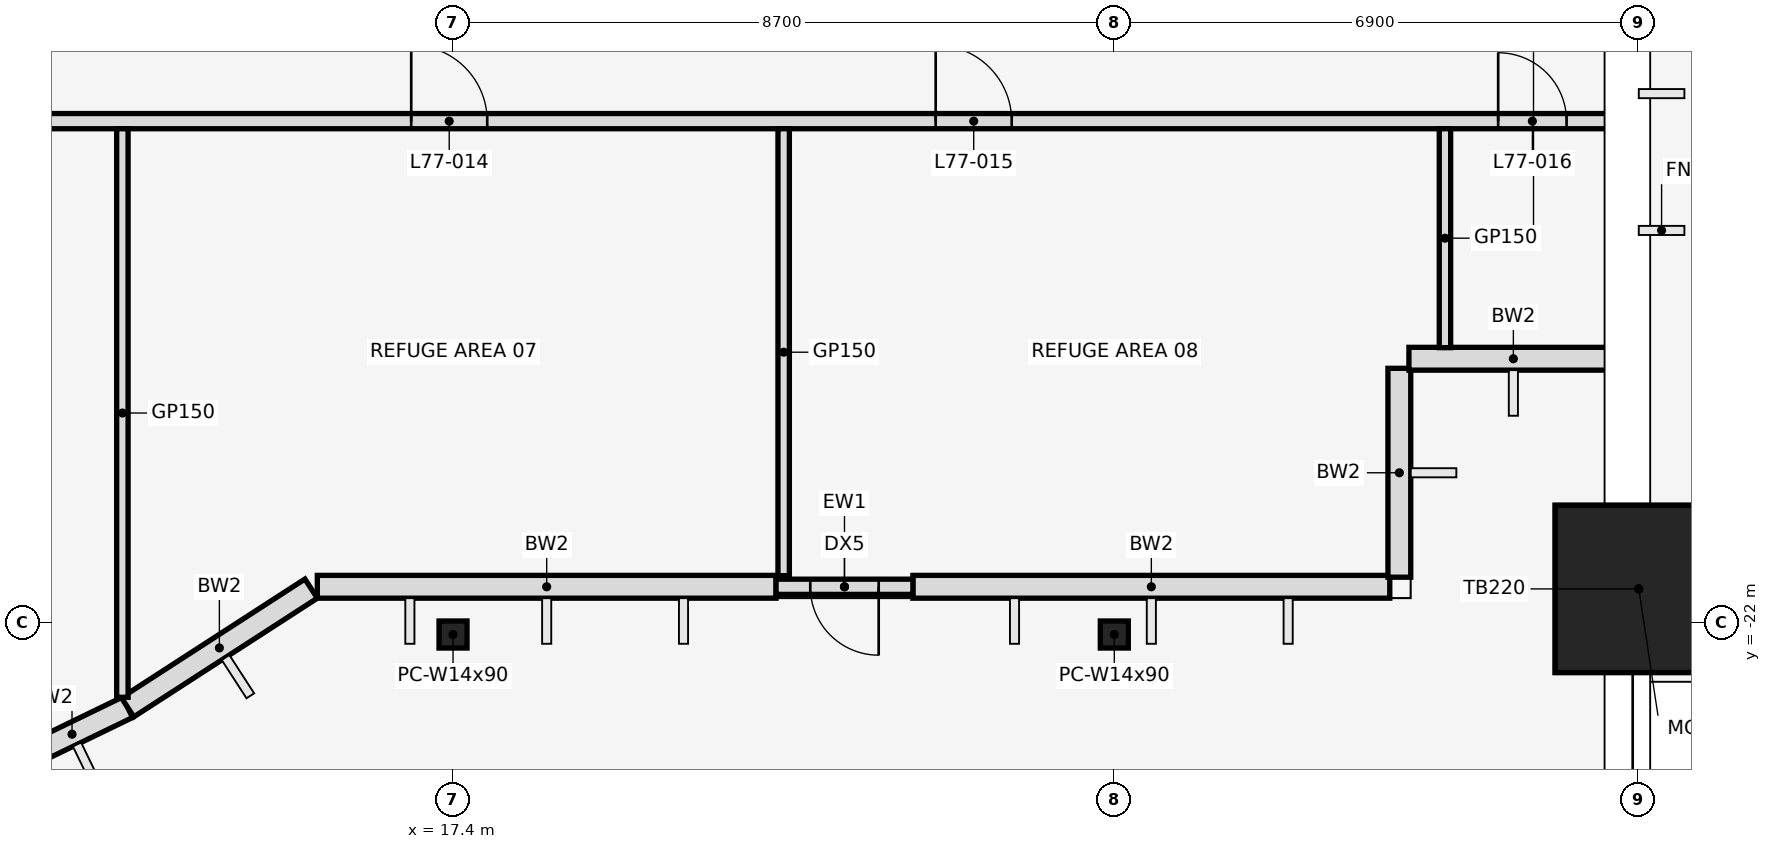
"""IFC4 building model, lengths in metres.
Left out: names, types, materials, properties, quantities, classifications, styles, units other than length and angle.
Written with IfcOpenShell. Run it as: python <this file> out.ifc"""

import sys

from ifc_helpers import new_model, si_unit, direction, frame, frame_2d, origin, origin_2d, place, context, subcontext, project, spatial, rectangle, hollow_rectangle, i_section, extrude, element, fill, save


model = new_model("IFC4")
c1 = context("Model", 3, precision=1e-05, world=origin(), true_north=direction((0.0, 1.0)))
c2 = subcontext(c1, "Body", "Model", "MODEL_VIEW")
j1 = project(units=[si_unit("LENGTHUNIT", "METRE"), si_unit("PLANEANGLEUNIT", "RADIAN")], contexts=[c1])
p1 = place(None, origin())
s1 = spatial("IfcSite", under=j1, at=p1, CompositionType="ELEMENT")
p2 = place(p1, origin())
s2 = spatial("IfcBuilding", under=s1, at=p2, CompositionType="ELEMENT")
p3 = place(p2, frame((0.0, 0.0, 342.5)))
s3 = spatial("IfcBuildingStorey", under=s2, at=p3, CompositionType="ELEMENT", Elevation=342.5)
for number, where, z_axis, x_axis in (
    (1, (17.4, -22.154, 0.0), (0.0, 0.0, 1.0), (1.0, 0.0, 0.0)),
    (2, (26.1, -22.154, 0.0), (0.0, 0.0, 1.0), (1.0, 0.0, 0.0)),
):
    element("IfcColumn", number, at=place(p3, frame(where, z_axis=z_axis, x_axis=x_axis)), inside=s3, PredefinedType="COLUMN", context=c2, shape_type="SweptSolid", body=[
        extrude(i_section(OverallWidth=0.368, OverallDepth=0.356, WebThickness=0.011, FlangeThickness=0.018, at=origin_2d()), origin(), (0.0, 0.0, 1.0), 5.4),
    ])
p4 = place(p3, frame((33.0, -21.554, 0.0), z_axis=(0.0, 0.0, 1.0), x_axis=(1.0, 0.0, 0.0)))
e3 = element("IfcColumn", 3, at=p4, inside=s3, PredefinedType="COLUMN", context=c2, shape_type="SweptSolid", body=[
    extrude(hollow_rectangle(XDim=2.2, YDim=2.2, WallThickness=0.06, at=origin_2d()), origin(), (0.0, 0.0, 1.0), 4.98),
])
p5 = place(p3, frame((33.0, -21.554, 4.98), z_axis=(0.0, 0.0, 1.0), x_axis=(1.0, 0.0, 0.0)))
e4 = element("IfcColumn", 4, at=p5, inside=s3, PredefinedType="COLUMN", context=c2, shape_type="SweptSolid", body=[
    extrude(rectangle(XDim=2.2, YDim=2.2, at=origin_2d()), origin(), (0.0, 0.0, 1.0), 0.42),
])
p6 = place(p3, frame((32.85, -18.4, 0.0), z_axis=(0.0, 0.0, 1.0), x_axis=(0.0, 1.0, 0.0)))
e5 = element("IfcWall", 5, at=p6, inside=s3, PredefinedType="STANDARD", context=c2, shape_type="SweptSolid", body=[
    extrude(rectangle(XDim=12.124, YDim=0.3, at=frame_2d((6.062, 0.0))), origin(), (0.0, 0.0, 1.0), 4.288),
])
p7 = place(p3, frame((11.656, -23.82, 0.0), z_axis=(0.0, 0.0, 1.0), x_axis=(0.899798026589, 0.436306671214, 0.0)))
e6 = element("IfcWall", 6, at=p7, inside=s3, PredefinedType="STANDARD", context=c2, shape_type="SweptSolid", body=[
    extrude(rectangle(XDim=1.625, YDim=0.3, at=frame_2d((0.813, 0.0))), origin(), (0.0, 0.0, 1.0), 4.672),
])
p8 = place(p3, frame((13.119, -23.111, 0.0), z_axis=(0.0, 0.0, 1.0), x_axis=(0.839779682339, 0.542927329512, 0.0)))
e7 = element("IfcWall", 7, at=p8, inside=s3, PredefinedType="STANDARD", context=c2, shape_type="SweptSolid", body=[
    extrude(rectangle(XDim=2.875, YDim=0.3, at=frame_2d((1.438, 0.0))), origin(), (0.0, 0.0, 1.0), 4.672),
])
p9 = place(p3, frame((15.615, -21.526, 0.0), z_axis=(0.0, 0.0, 1.0), x_axis=(1.0, 0.0, 0.0)))
e8 = element("IfcWall", 8, at=p9, inside=s3, PredefinedType="STANDARD", context=c2, shape_type="SweptSolid", body=[
    extrude(rectangle(XDim=6.035, YDim=0.3, at=frame_2d((3.018, 0.0))), origin(), (0.0, 0.0, 1.0), 4.745),
])
p10 = place(p3, frame((23.45, -21.526, 0.0), z_axis=(0.0, 0.0, 1.0), x_axis=(1.0, 0.0, 0.0)))
e9 = element("IfcWall", 9, at=p10, inside=s3, PredefinedType="STANDARD", context=c2, shape_type="SweptSolid", body=[
    extrude(rectangle(XDim=6.274, YDim=0.3, at=frame_2d((3.137, 0.0))), origin(), (0.0, 0.0, 1.0), 4.796),
])
for number, where, z_axis, x_axis in (
    (10, (29.85, -21.4, 0.0), (0.0, 0.0, 1.0), (0.0, 1.0, 0.0)),
    (11, (29.976, -18.526, 0.0), (0.0, 0.0, 1.0), (1.0, 0.0, 0.0)),
):
    element("IfcWall", number, at=place(p3, frame(where, z_axis=z_axis, x_axis=x_axis)), inside=s3, PredefinedType="STANDARD", context=c2, shape_type="SweptSolid", body=[
        extrude(rectangle(XDim=2.748, YDim=0.3, at=frame_2d((1.374, 0.0))), origin(), (0.0, 0.0, 1.0), 4.796),
    ])
p11 = place(p3, frame((23.45, -21.526, 0.0), z_axis=(0.0, 0.0, 1.0), x_axis=(-1.0, 0.0, 0.0)))
e12 = element("IfcWall", 12, at=p11, inside=s3, PredefinedType="STANDARD", context=c2, shape_type="SweptSolid", body=[
    extrude(rectangle(XDim=1.8, YDim=0.2, at=frame_2d((0.9, 0.0))), origin(), (0.0, 0.0, 1.0), 5.2),
])
p12 = place(p11, frame((0.45, 0.0, 0.0)))
e13 = element("IfcOpeningElement", 13, at=p12, cuts=e12, PredefinedType="OPENING", context=c2, shape_type="SweptSolid", body=[
    extrude(rectangle(XDim=0.9, YDim=2.1, at=frame_2d((0.45, 1.05))), frame((0.0, 0.112, 0.0), z_axis=(0.0, -1.0, 0.0), x_axis=(1.0, 0.0, 0.0)), (0.0, 0.0, 1.0), 0.224),
])
p13 = place(p3, frame((-32.7, -15.4, 0.0), z_axis=(0.0, 0.0, 1.0), x_axis=(1.0, 0.0, 0.0)))
e14 = element("IfcWall", 14, at=p13, inside=s3, PredefinedType="PARTITIONING", context=c2, shape_type="SweptSolid", body=[
    extrude(rectangle(XDim=65.4, YDim=0.2, at=frame_2d((32.7, 0.0))), origin(), (0.0, 0.0, 1.0), 4.268),
])
p14 = place(p13, frame((0.7, 0.0, 0.0)))
e15 = element("IfcOpeningElement", 15, at=p14, cuts=e14, PredefinedType="OPENING", context=c2, shape_type="SweptSolid", body=[
    extrude(rectangle(XDim=0.9, YDim=2.1, at=frame_2d((0.45, 1.05))), frame((0.0, 0.112, 0.0), z_axis=(0.0, -1.0, 0.0), x_axis=(1.0, 0.0, 0.0)), (0.0, 0.0, 1.0), 0.224),
])
p15 = place(p13, frame((7.95, 0.0, 0.0)))
e16 = element("IfcOpeningElement", 16, at=p15, cuts=e14, PredefinedType="OPENING", context=c2, shape_type="SweptSolid", body=[
    extrude(rectangle(XDim=1.0, YDim=2.1, at=frame_2d((0.5, 1.05))), frame((0.0, 0.112, 0.0), z_axis=(0.0, -1.0, 0.0), x_axis=(1.0, 0.0, 0.0)), (0.0, 0.0, 1.0), 0.224),
])
p16 = place(p13, frame((14.85, 0.0, 0.0)))
e17 = element("IfcOpeningElement", 17, at=p16, cuts=e14, PredefinedType="OPENING", context=c2, shape_type="SweptSolid", body=[
    extrude(rectangle(XDim=0.9, YDim=2.1, at=frame_2d((0.45, 1.05))), frame((0.0, 0.112, 0.0), z_axis=(0.0, -1.0, 0.0), x_axis=(1.0, 0.0, 0.0)), (0.0, 0.0, 1.0), 0.224),
])
p17 = place(p13, frame((23.55, 0.0, 0.0)))
e18 = element("IfcOpeningElement", 18, at=p17, cuts=e14, PredefinedType="OPENING", context=c2, shape_type="SweptSolid", body=[
    extrude(rectangle(XDim=1.0, YDim=2.1, at=frame_2d((0.5, 1.05))), frame((0.0, 0.112, 0.0), z_axis=(0.0, -1.0, 0.0), x_axis=(1.0, 0.0, 0.0)), (0.0, 0.0, 1.0), 0.224),
])
p18 = place(p13, frame((32.15, 0.0, 0.0)))
e19 = element("IfcOpeningElement", 19, at=p18, cuts=e14, PredefinedType="OPENING", context=c2, shape_type="SweptSolid", body=[
    extrude(rectangle(XDim=1.0, YDim=2.1, at=frame_2d((0.5, 1.05))), frame((0.0, 0.112, 0.0), z_axis=(0.0, -1.0, 0.0), x_axis=(1.0, 0.0, 0.0)), (0.0, 0.0, 1.0), 0.224),
])
p19 = place(p13, frame((40.95, 0.0, 0.0)))
e20 = element("IfcOpeningElement", 20, at=p19, cuts=e14, PredefinedType="OPENING", context=c2, shape_type="SweptSolid", body=[
    extrude(rectangle(XDim=1.0, YDim=2.1, at=frame_2d((0.5, 1.05))), frame((0.0, 0.112, 0.0), z_axis=(0.0, -1.0, 0.0), x_axis=(1.0, 0.0, 0.0)), (0.0, 0.0, 1.0), 0.224),
])
p20 = place(p13, frame((49.55, 0.0, 0.0)))
e21 = element("IfcOpeningElement", 21, at=p20, cuts=e14, PredefinedType="OPENING", context=c2, shape_type="SweptSolid", body=[
    extrude(rectangle(XDim=1.0, YDim=2.1, at=frame_2d((0.5, 1.05))), frame((0.0, 0.112, 0.0), z_axis=(0.0, -1.0, 0.0), x_axis=(1.0, 0.0, 0.0)), (0.0, 0.0, 1.0), 0.224),
])
p21 = place(p13, frame((56.45, 0.0, 0.0)))
e22 = element("IfcOpeningElement", 22, at=p21, cuts=e14, PredefinedType="OPENING", context=c2, shape_type="SweptSolid", body=[
    extrude(rectangle(XDim=1.0, YDim=2.1, at=frame_2d((0.5, 1.05))), frame((0.0, 0.112, 0.0), z_axis=(0.0, -1.0, 0.0), x_axis=(1.0, 0.0, 0.0)), (0.0, 0.0, 1.0), 0.224),
])
p22 = place(p13, frame((63.85, 0.0, 0.0)))
e23 = element("IfcOpeningElement", 23, at=p22, cuts=e14, PredefinedType="OPENING", context=c2, shape_type="SweptSolid", body=[
    extrude(rectangle(XDim=0.9, YDim=2.1, at=frame_2d((0.45, 1.05))), frame((0.0, 0.112, 0.0), z_axis=(0.0, -1.0, 0.0), x_axis=(1.0, 0.0, 0.0)), (0.0, 0.0, 1.0), 0.224),
])
p23 = place(p3, frame((13.05, -22.98, 0.0), z_axis=(0.0, 0.0, 1.0), x_axis=(0.0, 1.0, 0.0)))
e24 = element("IfcWall", 24, at=p23, inside=s3, PredefinedType="PARTITIONING", context=c2, shape_type="SweptSolid", body=[
    extrude(rectangle(XDim=7.48, YDim=0.15, at=frame_2d((3.74, 0.0))), origin(), (0.0, 0.0, 1.0), 4.268),
])
p24 = place(p3, frame((21.75, -21.38, 0.0), z_axis=(0.0, 0.0, 1.0), x_axis=(0.0, 1.0, 0.0)))
e25 = element("IfcWall", 25, at=p24, inside=s3, PredefinedType="PARTITIONING", context=c2, shape_type="SweptSolid", body=[
    extrude(rectangle(XDim=5.88, YDim=0.15, at=frame_2d((2.94, 0.0))), origin(), (0.0, 0.0, 1.0), 4.268),
])
p25 = place(p3, frame((30.45, -18.38, 0.0), z_axis=(0.0, 0.0, 1.0), x_axis=(0.0, 1.0, 0.0)))
e26 = element("IfcWall", 26, at=p25, inside=s3, PredefinedType="PARTITIONING", context=c2, shape_type="SweptSolid", body=[
    extrude(rectangle(XDim=2.88, YDim=0.15, at=frame_2d((1.44, 0.0))), origin(), (0.0, 0.0, 1.0), 4.268),
])
p26 = place(p12, origin())
e27 = element("IfcDoor", 27, at=p26, inside=s3, OperationType="SINGLE_SWING_LEFT", PredefinedType="DOOR", context=c2, shape_type="SweptSolid", body=[
    extrude(rectangle(XDim=0.9, YDim=2.1, at=frame_2d((0.45, 1.05))), frame((0.0, 0.025, 0.0), z_axis=(0.0, -1.0, 0.0), x_axis=(1.0, 0.0, 0.0)), (0.0, 0.0, 1.0), 0.05),
])
fill(e13, e27)
p27 = place(p20, frame((1.0, 0.0, 0.0), z_axis=(0.0, 0.0, 1.0), x_axis=(-1.0, 0.0, 0.0)))
e28 = element("IfcDoor", 28, at=p27, inside=s3, OperationType="SINGLE_SWING_RIGHT", PredefinedType="DOOR", context=c2, shape_type="SweptSolid", body=[
    extrude(rectangle(XDim=1.0, YDim=2.1, at=frame_2d((0.5, 1.05))), frame((0.0, 0.025, 0.0), z_axis=(0.0, -1.0, 0.0), x_axis=(1.0, 0.0, 0.0)), (0.0, 0.0, 1.0), 0.05),
])
fill(e21, e28)
p28 = place(p21, frame((1.0, 0.0, 0.0), z_axis=(0.0, 0.0, 1.0), x_axis=(-1.0, 0.0, 0.0)))
e29 = element("IfcDoor", 29, at=p28, inside=s3, OperationType="SINGLE_SWING_RIGHT", PredefinedType="DOOR", context=c2, shape_type="SweptSolid", body=[
    extrude(rectangle(XDim=1.0, YDim=2.1, at=frame_2d((0.5, 1.05))), frame((0.0, 0.025, 0.0), z_axis=(0.0, -1.0, 0.0), x_axis=(1.0, 0.0, 0.0)), (0.0, 0.0, 1.0), 0.05),
])
fill(e22, e29)
p29 = place(p22, frame((0.9, 0.0, 0.0), z_axis=(0.0, 0.0, 1.0), x_axis=(-1.0, 0.0, 0.0)))
e30 = element("IfcDoor", 30, at=p29, inside=s3, OperationType="SINGLE_SWING_LEFT", PredefinedType="DOOR", context=c2, shape_type="SweptSolid", body=[
    extrude(rectangle(XDim=0.9, YDim=2.1, at=frame_2d((0.45, 1.05))), frame((0.0, 0.025, 0.0), z_axis=(0.0, -1.0, 0.0), x_axis=(1.0, 0.0, 0.0)), (0.0, 0.0, 1.0), 0.05),
])
fill(e23, e30)
save(model, sys.argv[1])
